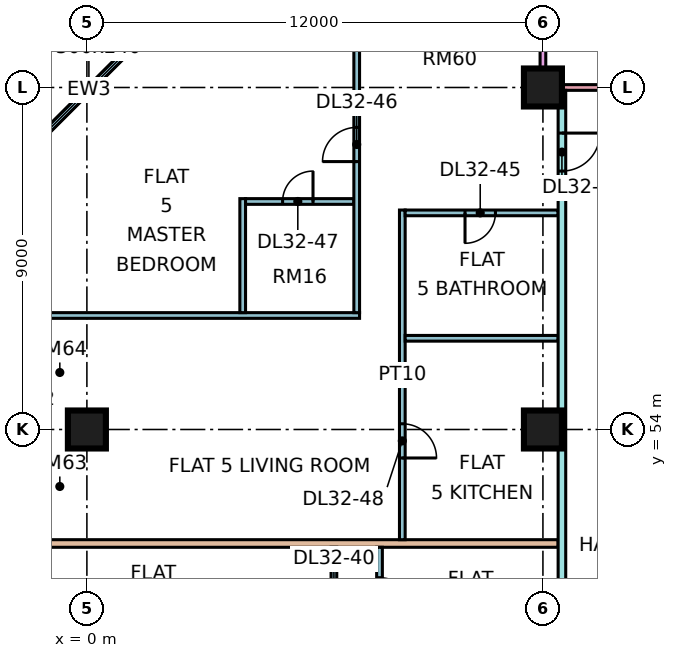
"""IFC4 building model, lengths in metres.
Left out: names, types, materials, properties, quantities, classifications, styles, units other than length and angle.
Written with IfcOpenShell. Run it as: python <this file> out.ifc"""

import sys

from ifc_helpers import new_model, si_unit, direction, frame, frame_2d, origin, origin_2d, place, context, subcontext, project, spatial, rectangle, extrude, element, fill, save


model = new_model("IFC4")
c1 = context("Model", 3, precision=1e-05, world=origin(), true_north=direction((0.0, 1.0)))
c2 = subcontext(c1, "Body", "Model", "MODEL_VIEW")
j1 = project(units=[si_unit("LENGTHUNIT", "METRE"), si_unit("PLANEANGLEUNIT", "RADIAN")], contexts=[c1])
p1 = place(None, origin())
s1 = spatial("IfcSite", under=j1, at=p1, CompositionType="ELEMENT")
p2 = place(p1, origin())
s2 = spatial("IfcBuilding", under=s1, at=p2, CompositionType="ELEMENT")
p3 = place(p2, frame((0.0, 0.0, 136.9)))
s3 = spatial("IfcBuildingStorey", under=s2, at=p3, CompositionType="ELEMENT", Elevation=136.9)
for number, where, z_axis, x_axis in (
    (1, (0.0, 54.0, 0.0), (0.0, 0.0, 1.0), (1.0, 0.0, 0.0)),
    (2, (12.0, 54.0, 0.0), (0.0, 0.0, 1.0), (1.0, 0.0, 0.0)),
    (3, (12.0, 63.0, 0.0), (0.0, 0.0, 1.0), (1.0, 0.0, 0.0)),
):
    element("IfcColumn", number, at=place(p3, frame(where, z_axis=z_axis, x_axis=x_axis)), inside=s3, PredefinedType="COLUMN", context=c2, shape_type="SweptSolid", body=[
        extrude(rectangle(XDim=1.0, YDim=1.0, at=origin_2d()), origin(), (0.0, 0.0, 1.0), 3.75),
    ])
p4 = place(p3, frame((22.425, 63.0, 0.0), z_axis=(0.0, 0.0, 1.0), x_axis=(-1.0, 0.0, 0.0)))
e4 = element("IfcWall", 4, at=p4, inside=s3, PredefinedType="SOLIDWALL", context=c2, shape_type="SweptSolid", body=[
    extrude(rectangle(XDim=10.35, YDim=0.15, at=frame_2d((5.175, 0.0))), origin(), (0.0, 0.0, 1.0), 3.3),
])
p5 = place(p4, frame((0.562, 0.0, 0.45)))
e5 = element("IfcOpeningElement", 5, at=p5, cuts=e4, PredefinedType="OPENING", context=c2, shape_type="SweptSolid", body=[
    extrude(rectangle(XDim=1.8, YDim=2.4, at=frame_2d((0.9, 1.2))), frame((0.0, 0.085, 0.0), z_axis=(0.0, -1.0, 0.0), x_axis=(1.0, 0.0, 0.0)), (0.0, 0.0, 1.0), 0.17),
])
p6 = place(p4, frame((4.575, 0.0, 0.45)))
e6 = element("IfcOpeningElement", 6, at=p6, cuts=e4, PredefinedType="OPENING", context=c2, shape_type="SweptSolid", body=[
    extrude(rectangle(XDim=1.8, YDim=2.4, at=frame_2d((0.9, 1.2))), frame((0.0, 0.085, 0.0), z_axis=(0.0, -1.0, 0.0), x_axis=(1.0, 0.0, 0.0)), (0.0, 0.0, 1.0), 0.17),
])
p7 = place(p3, frame((12.0, 64.5, 0.0), z_axis=(0.0, 0.0, 1.0), x_axis=(0.0, -1.0, 0.0)))
e7 = element("IfcWall", 7, at=p7, inside=s3, PredefinedType="SOLIDWALL", context=c2, shape_type="SweptSolid", body=[
    extrude(rectangle(XDim=1.5, YDim=0.15, at=frame_2d((0.75, 0.0))), origin(), (0.0, 0.0, 1.0), 3.3),
])
p8 = place(p3, frame((1.553, 64.447, 0.0), z_axis=(0.0, 0.0, 1.0), x_axis=(-0.707106781187, -0.707106781187, 0.0)))
e8 = element("IfcWall", 8, at=p8, inside=s3, PredefinedType="SOLIDWALL", context=c2, shape_type="SweptSolid", body=[
    extrude(rectangle(XDim=4.243, YDim=0.15, at=frame_2d((2.121, 0.0))), origin(), (0.0, 0.0, 1.0), 3.3),
])
p9 = place(p8, frame((0.621, 0.0, 0.45)))
e9 = element("IfcOpeningElement", 9, at=p9, cuts=e8, PredefinedType="OPENING", context=c2, shape_type="SweptSolid", body=[
    extrude(rectangle(XDim=3.0, YDim=2.4, at=frame_2d((1.5, 1.2))), frame((0.0, 0.085, 0.0), z_axis=(0.0, -1.0, 0.0), x_axis=(1.0, 0.0, 0.0)), (0.0, 0.0, 1.0), 0.17),
])
p10 = place(p3, frame((-1.35, 51.0, 0.0), z_axis=(0.0, 0.0, 1.0), x_axis=(1.0, 0.0, 0.0)))
e10 = element("IfcWall", 10, at=p10, inside=s3, PredefinedType="PARTITIONING", context=c2, shape_type="SweptSolid", body=[
    extrude(rectangle(XDim=13.75, YDim=0.2, at=frame_2d((6.875, 0.0))), origin(), (0.0, 0.0, 1.0), 3.3),
])
p11 = place(p3, frame((-1.35, 57.0, 0.0), z_axis=(0.0, 0.0, 1.0), x_axis=(1.0, 0.0, 0.0)))
e11 = element("IfcWall", 11, at=p11, inside=s3, PredefinedType="PARTITIONING", context=c2, shape_type="SweptSolid", body=[
    extrude(rectangle(XDim=8.525, YDim=0.15, at=frame_2d((4.263, 0.0))), origin(), (0.0, 0.0, 1.0), 3.3),
])
p12 = place(p3, frame((4.1, 57.075, 0.0), z_axis=(0.0, 0.0, 1.0), x_axis=(0.0, 1.0, 0.0)))
e12 = element("IfcWall", 12, at=p12, inside=s3, PredefinedType="PARTITIONING", context=c2, shape_type="SweptSolid", body=[
    extrude(rectangle(XDim=3.0, YDim=0.15, at=frame_2d((1.5, 0.0))), origin(), (0.0, 0.0, 1.0), 3.3),
])
p13 = place(p3, frame((4.175, 60.0, 0.0), z_axis=(0.0, 0.0, 1.0), x_axis=(1.0, 0.0, 0.0)))
e13 = element("IfcWall", 13, at=p13, inside=s3, PredefinedType="PARTITIONING", context=c2, shape_type="SweptSolid", body=[
    extrude(rectangle(XDim=2.85, YDim=0.15, at=frame_2d((1.425, 0.0))), origin(), (0.0, 0.0, 1.0), 3.3),
])
p14 = place(p13, frame((0.975, 0.0, 0.0)))
e14 = element("IfcOpeningElement", 14, at=p14, cuts=e13, PredefinedType="OPENING", context=c2, shape_type="SweptSolid", body=[
    extrude(rectangle(XDim=0.8, YDim=2.1, at=frame_2d((0.4, 1.05))), frame((0.0, 0.085, 0.0), z_axis=(0.0, -1.0, 0.0), x_axis=(1.0, 0.0, 0.0)), (0.0, 0.0, 1.0), 0.17),
])
p15 = place(p3, frame((6.5, 41.95, 0.0), z_axis=(0.0, 0.0, 1.0), x_axis=(0.0, 1.0, 0.0)))
e15 = element("IfcWall", 15, at=p15, inside=s3, PredefinedType="PARTITIONING", context=c2, shape_type="SweptSolid", body=[
    extrude(rectangle(XDim=8.95, YDim=0.15, at=frame_2d((4.475, 0.0))), origin(), (0.0, 0.0, 1.0), 3.3),
])
p16 = place(p15, frame((1.1, 0.0, 0.0)))
e16 = element("IfcOpeningElement", 16, at=p16, cuts=e15, PredefinedType="OPENING", context=c2, shape_type="SweptSolid", body=[
    extrude(rectangle(XDim=0.9, YDim=2.1, at=frame_2d((0.45, 1.05))), frame((0.0, 0.085, 0.0), z_axis=(0.0, -1.0, 0.0), x_axis=(1.0, 0.0, 0.0)), (0.0, 0.0, 1.0), 0.17),
])
p17 = place(p15, frame((7.1, 0.0, 0.0)))
e17 = element("IfcOpeningElement", 17, at=p17, cuts=e15, PredefinedType="OPENING", context=c2, shape_type="SweptSolid", body=[
    extrude(rectangle(XDim=0.9, YDim=2.1, at=frame_2d((0.45, 1.05))), frame((0.0, 0.085, 0.0), z_axis=(0.0, -1.0, 0.0), x_axis=(1.0, 0.0, 0.0)), (0.0, 0.0, 1.0), 0.17),
])
p18 = place(p3, frame((7.1, 57.075, 0.0), z_axis=(0.0, 0.0, 1.0), x_axis=(0.0, 1.0, 0.0)))
e18 = element("IfcWall", 18, at=p18, inside=s3, PredefinedType="PARTITIONING", context=c2, shape_type="SweptSolid", body=[
    extrude(rectangle(XDim=7.275, YDim=0.15, at=frame_2d((3.638, 0.0))), origin(), (0.0, 0.0, 1.0), 3.3),
])
p19 = place(p18, frame((3.975, 0.0, 0.0)))
e19 = element("IfcOpeningElement", 19, at=p19, cuts=e18, PredefinedType="OPENING", context=c2, shape_type="SweptSolid", body=[
    extrude(rectangle(XDim=0.9, YDim=2.1, at=frame_2d((0.45, 1.05))), frame((0.0, 0.085, 0.0), z_axis=(0.0, -1.0, 0.0), x_axis=(1.0, 0.0, 0.0)), (0.0, 0.0, 1.0), 0.17),
])
p20 = place(p3, frame((7.7, 39.525, 0.0), z_axis=(0.0, 0.0, 1.0), x_axis=(0.0, 1.0, 0.0)))
e20 = element("IfcWall", 20, at=p20, inside=s3, PredefinedType="PARTITIONING", context=c2, shape_type="SweptSolid", body=[
    extrude(rectangle(XDim=11.375, YDim=0.15, at=frame_2d((5.688, 0.0))), origin(), (0.0, 0.0, 1.0), 3.3),
])
p21 = place(p20, frame((0.825, 0.0, 0.0)))
e21 = element("IfcOpeningElement", 21, at=p21, cuts=e20, PredefinedType="OPENING", context=c2, shape_type="SweptSolid", body=[
    extrude(rectangle(XDim=0.8, YDim=2.1, at=frame_2d((0.4, 1.05))), frame((0.0, 0.085, 0.0), z_axis=(0.0, -1.0, 0.0), x_axis=(1.0, 0.0, 0.0)), (0.0, 0.0, 1.0), 0.17),
])
p22 = place(p20, frame((5.175, 0.0, 0.0)))
e22 = element("IfcOpeningElement", 22, at=p22, cuts=e20, PredefinedType="OPENING", context=c2, shape_type="SweptSolid", body=[
    extrude(rectangle(XDim=0.9, YDim=2.1, at=frame_2d((0.45, 1.05))), frame((0.0, 0.085, 0.0), z_axis=(0.0, -1.0, 0.0), x_axis=(1.0, 0.0, 0.0)), (0.0, 0.0, 1.0), 0.17),
])
p23 = place(p20, frame((9.675, 0.0, 0.0)))
e23 = element("IfcOpeningElement", 23, at=p23, cuts=e20, PredefinedType="OPENING", context=c2, shape_type="SweptSolid", body=[
    extrude(rectangle(XDim=0.9, YDim=2.1, at=frame_2d((0.45, 1.05))), frame((0.0, 0.085, 0.0), z_axis=(0.0, -1.0, 0.0), x_axis=(1.0, 0.0, 0.0)), (0.0, 0.0, 1.0), 0.17),
])
p24 = place(p3, frame((8.3, 51.1, 0.0), z_axis=(0.0, 0.0, 1.0), x_axis=(0.0, 1.0, 0.0)))
e24 = element("IfcWall", 24, at=p24, inside=s3, PredefinedType="PARTITIONING", context=c2, shape_type="SweptSolid", body=[
    extrude(rectangle(XDim=8.675, YDim=0.15, at=frame_2d((4.337, 0.0))), origin(), (0.0, 0.0, 1.0), 3.3),
])
p25 = place(p24, frame((2.15, 0.0, 0.0)))
e25 = element("IfcOpeningElement", 25, at=p25, cuts=e24, PredefinedType="OPENING", context=c2, shape_type="SweptSolid", body=[
    extrude(rectangle(XDim=0.9, YDim=2.1, at=frame_2d((0.45, 1.05))), frame((0.0, 0.085, 0.0), z_axis=(0.0, -1.0, 0.0), x_axis=(1.0, 0.0, 0.0)), (0.0, 0.0, 1.0), 0.17),
])
p26 = place(p3, frame((8.375, 56.4, 0.0), z_axis=(0.0, 0.0, 1.0), x_axis=(1.0, 0.0, 0.0)))
e26 = element("IfcWall", 26, at=p26, inside=s3, PredefinedType="PARTITIONING", context=c2, shape_type="SweptSolid", body=[
    extrude(rectangle(XDim=4.025, YDim=0.15, at=frame_2d((2.012, 0.0))), origin(), (0.0, 0.0, 1.0), 3.3),
])
p27 = place(p3, frame((8.375, 59.7, 0.0), z_axis=(0.0, 0.0, 1.0), x_axis=(1.0, 0.0, 0.0)))
e27 = element("IfcWall", 27, at=p27, inside=s3, PredefinedType="PARTITIONING", context=c2, shape_type="SweptSolid", body=[
    extrude(rectangle(XDim=4.025, YDim=0.15, at=frame_2d((2.012, 0.0))), origin(), (0.0, 0.0, 1.0), 3.3),
])
p28 = place(p27, frame((1.575, 0.0, 0.0)))
e28 = element("IfcOpeningElement", 28, at=p28, cuts=e27, PredefinedType="OPENING", context=c2, shape_type="SweptSolid", body=[
    extrude(rectangle(XDim=0.8, YDim=2.1, at=frame_2d((0.4, 1.05))), frame((0.0, 0.085, 0.0), z_axis=(0.0, -1.0, 0.0), x_axis=(1.0, 0.0, 0.0)), (0.0, 0.0, 1.0), 0.17),
])
p29 = place(p3, frame((12.5, 20.0, 0.0), z_axis=(0.0, 0.0, 1.0), x_axis=(0.0, 1.0, 0.0)))
e29 = element("IfcWall", 29, at=p29, inside=s3, PredefinedType="PARTITIONING", context=c2, shape_type="SweptSolid", body=[
    extrude(rectangle(XDim=42.926, YDim=0.2, at=frame_2d((21.463, 0.0))), origin(), (0.0, 0.0, 1.0), 3.3),
])
p30 = place(p29, frame((17.25, 0.0, 0.0)))
e30 = element("IfcOpeningElement", 30, at=p30, cuts=e29, PredefinedType="OPENING", context=c2, shape_type="SweptSolid", body=[
    extrude(rectangle(XDim=1.0, YDim=2.1, at=frame_2d((0.5, 1.05))), frame((0.0, 0.11, 0.0), z_axis=(0.0, -1.0, 0.0), x_axis=(1.0, 0.0, 0.0)), (0.0, 0.0, 1.0), 0.22),
])
p31 = place(p29, frame((40.8, 0.0, 0.0)))
e31 = element("IfcOpeningElement", 31, at=p31, cuts=e29, PredefinedType="OPENING", context=c2, shape_type="SweptSolid", body=[
    extrude(rectangle(XDim=1.0, YDim=2.1, at=frame_2d((0.5, 1.05))), frame((0.0, 0.11, 0.0), z_axis=(0.0, -1.0, 0.0), x_axis=(1.0, 0.0, 0.0)), (0.0, 0.0, 1.0), 0.22),
])
p32 = place(p29, frame((0.6, 0.0, 0.0)))
e32 = element("IfcOpeningElement", 32, at=p32, cuts=e29, PredefinedType="OPENING", context=c2, shape_type="SweptSolid", body=[
    extrude(rectangle(XDim=1.2, YDim=2.1, at=frame_2d((0.6, 1.05))), frame((0.0, 0.11, 0.0), z_axis=(0.0, -1.0, 0.0), x_axis=(1.0, 0.0, 0.0)), (0.0, 0.0, 1.0), 0.22),
])
p33 = place(p29, frame((13.65, 0.0, 0.0)))
e33 = element("IfcOpeningElement", 33, at=p33, cuts=e29, PredefinedType="OPENING", context=c2, shape_type="SweptSolid", body=[
    extrude(rectangle(XDim=1.0, YDim=2.1, at=frame_2d((0.5, 1.05))), frame((0.0, 0.11, 0.0), z_axis=(0.0, -1.0, 0.0), x_axis=(1.0, 0.0, 0.0)), (0.0, 0.0, 1.0), 0.22),
])
p34 = place(p9, origin())
e34 = element("IfcWindow", 34, at=p34, inside=s3, PartitioningType="SINGLE_PANEL", PredefinedType="WINDOW", context=c2, shape_type="SweptSolid", body=[
    extrude(rectangle(XDim=3.0, YDim=2.4, at=frame_2d((1.5, 1.2))), frame((0.0, 0.03, 0.0), z_axis=(0.0, -1.0, 0.0), x_axis=(1.0, 0.0, 0.0)), (0.0, 0.0, 1.0), 0.06),
])
fill(e9, e34)
p35 = place(p23, frame((0.9, 0.0, 0.0), z_axis=(0.0, 0.0, 1.0), x_axis=(-1.0, 0.0, 0.0)))
e35 = element("IfcDoor", 35, at=p35, inside=s3, OperationType="SINGLE_SWING_LEFT", PredefinedType="DOOR", context=c2, shape_type="SweptSolid", body=[
    extrude(rectangle(XDim=0.9, YDim=2.1, at=frame_2d((0.45, 1.05))), frame((0.0, 0.025, 0.0), z_axis=(0.0, -1.0, 0.0), x_axis=(1.0, 0.0, 0.0)), (0.0, 0.0, 1.0), 0.05),
])
fill(e23, e35)
p36 = place(p28, frame((0.8, 0.0, 0.0), z_axis=(0.0, 0.0, 1.0), x_axis=(-1.0, 0.0, 0.0)))
e36 = element("IfcDoor", 36, at=p36, inside=s3, OperationType="SINGLE_SWING_LEFT", PredefinedType="DOOR", context=c2, shape_type="SweptSolid", body=[
    extrude(rectangle(XDim=0.8, YDim=2.1, at=frame_2d((0.4, 1.05))), frame((0.0, 0.025, 0.0), z_axis=(0.0, -1.0, 0.0), x_axis=(1.0, 0.0, 0.0)), (0.0, 0.0, 1.0), 0.05),
])
fill(e28, e36)
p37 = place(p19, origin())
e37 = element("IfcDoor", 37, at=p37, inside=s3, OperationType="SINGLE_SWING_LEFT", PredefinedType="DOOR", context=c2, shape_type="SweptSolid", body=[
    extrude(rectangle(XDim=0.9, YDim=2.1, at=frame_2d((0.45, 1.05))), frame((0.0, 0.025, 0.0), z_axis=(0.0, -1.0, 0.0), x_axis=(1.0, 0.0, 0.0)), (0.0, 0.0, 1.0), 0.05),
])
fill(e19, e37)
p38 = place(p14, frame((0.8, 0.0, 0.0), z_axis=(0.0, 0.0, 1.0), x_axis=(-1.0, 0.0, 0.0)))
e38 = element("IfcDoor", 38, at=p38, inside=s3, OperationType="SINGLE_SWING_RIGHT", PredefinedType="DOOR", context=c2, shape_type="SweptSolid", body=[
    extrude(rectangle(XDim=0.8, YDim=2.1, at=frame_2d((0.4, 1.05))), frame((0.0, 0.025, 0.0), z_axis=(0.0, -1.0, 0.0), x_axis=(1.0, 0.0, 0.0)), (0.0, 0.0, 1.0), 0.05),
])
fill(e14, e38)
p39 = place(p25, frame((0.9, 0.0, 0.0), z_axis=(0.0, 0.0, 1.0), x_axis=(-1.0, 0.0, 0.0)))
e39 = element("IfcDoor", 39, at=p39, inside=s3, OperationType="SINGLE_SWING_LEFT", PredefinedType="DOOR", context=c2, shape_type="SweptSolid", body=[
    extrude(rectangle(XDim=0.9, YDim=2.1, at=frame_2d((0.45, 1.05))), frame((0.0, 0.025, 0.0), z_axis=(0.0, -1.0, 0.0), x_axis=(1.0, 0.0, 0.0)), (0.0, 0.0, 1.0), 0.05),
])
fill(e25, e39)
p40 = place(p31, origin())
e40 = element("IfcDoor", 40, at=p40, inside=s3, OperationType="SINGLE_SWING_RIGHT", PredefinedType="DOOR", context=c2, shape_type="SweptSolid", body=[
    extrude(rectangle(XDim=1.0, YDim=2.1, at=frame_2d((0.5, 1.05))), frame((0.0, 0.025, 0.0), z_axis=(0.0, -1.0, 0.0), x_axis=(1.0, 0.0, 0.0)), (0.0, 0.0, 1.0), 0.05),
])
fill(e31, e40)
save(model, sys.argv[1])
